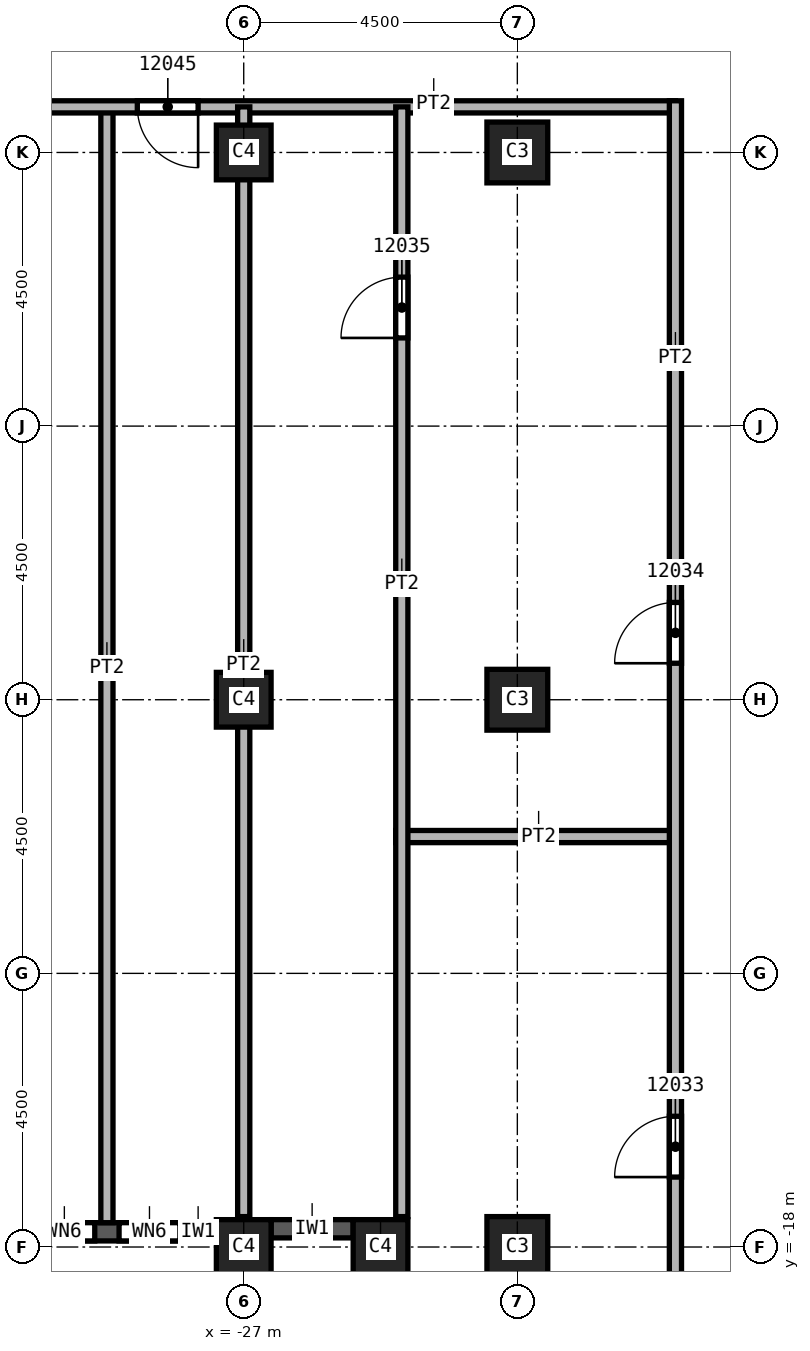
"""IFC4 building model, lengths in metres.
Left out: names, types, materials, properties, quantities, classifications, styles, units other than length and angle.
Written with IfcOpenShell. Run it as: python <this file> out.ifc"""

import sys

from ifc_helpers import new_model, si_unit, direction, frame, frame_2d, origin, origin_2d, place, context, subcontext, project, spatial, rectangle, extrude, element, fill, save


model = new_model("IFC4")
c1 = context("Model", 3, precision=1e-05, world=origin(), true_north=direction((0.0, 1.0)))
c2 = subcontext(c1, "Body", "Model", "MODEL_VIEW")
j1 = project(units=[si_unit("LENGTHUNIT", "METRE"), si_unit("PLANEANGLEUNIT", "RADIAN")], contexts=[c1])
p1 = place(None, origin())
s1 = spatial("IfcSite", under=j1, at=p1, CompositionType="ELEMENT")
p2 = place(p1, origin())
s2 = spatial("IfcBuilding", under=s1, at=p2, CompositionType="ELEMENT")
p3 = place(p2, frame((0.0, 0.0, 196.0)))
s3 = spatial("IfcBuildingStorey", under=s2, at=p3, CompositionType="ELEMENT", Elevation=196.0)
for number, where, z_axis, x_axis in (
    (1, (-22.5, 0.0, 0.0), (0.0, 0.0, 1.0), (1.0, 0.0, 0.0)),
    (2, (-22.5, -9.0, 0.0), (0.0, 0.0, 1.0), (1.0, 0.0, 0.0)),
    (3, (-22.5, -18.0, 0.0), (0.0, 0.0, 1.0), (1.0, 0.0, 0.0)),
):
    element("IfcColumn", number, at=place(p3, frame(where, z_axis=z_axis, x_axis=x_axis)), inside=s3, PredefinedType="COLUMN", context=c2, shape_type="SweptSolid", body=[
        extrude(rectangle(XDim=1.0, YDim=1.0, at=origin_2d()), origin(), (0.0, 0.0, 1.0), 3.72),
    ])
for number, where, z_axis, x_axis in (
    (4, (-27.0, 0.0, 0.0), (0.0, 0.0, 1.0), (1.0, 0.0, 0.0)),
    (5, (-27.0, -9.0, 0.0), (0.0, 0.0, 1.0), (1.0, 0.0, 0.0)),
    (6, (-27.0, -18.0, 0.0), (0.0, 0.0, 1.0), (1.0, 0.0, 0.0)),
    (7, (-24.75, -18.0, 0.0), (0.0, 0.0, 1.0), (1.0, 0.0, 0.0)),
):
    element("IfcColumn", number, at=place(p3, frame(where, z_axis=z_axis, x_axis=x_axis)), inside=s3, PredefinedType="COLUMN", context=c2, shape_type="SweptSolid", body=[
        extrude(rectangle(XDim=0.9, YDim=0.9, at=origin_2d()), origin(), (0.0, 0.0, 1.0), 3.72),
    ])
p4 = place(p3, frame((-31.05, -17.75, 0.0), z_axis=(0.0, 0.0, 1.0), x_axis=(1.0, 0.0, 0.0)))
e8 = element("IfcWall", 8, at=p4, inside=s3, PredefinedType="SOLIDWALL", context=c2, shape_type="SweptSolid", body=[
    extrude(rectangle(XDim=3.6, YDim=0.3, at=frame_2d((1.8, 0.0))), origin(), (0.0, 0.0, 1.0), 3.12),
])
p5 = place(p4, frame((0.6, 0.0, 0.8)))
e9 = element("IfcOpeningElement", 9, at=p5, cuts=e8, PredefinedType="OPENING", context=c2, shape_type="SweptSolid", body=[
    extrude(rectangle(XDim=1.0, YDim=1.95, at=frame_2d((0.5, 0.975))), frame((0.0, 0.15, 0.0), z_axis=(0.0, -1.0, 0.0), x_axis=(1.0, 0.0, 0.0)), (0.0, 0.0, 1.0), 0.3),
])
p6 = place(p4, frame((2.0, 0.0, 0.8)))
e10 = element("IfcOpeningElement", 10, at=p6, cuts=e8, PredefinedType="OPENING", context=c2, shape_type="SweptSolid", body=[
    extrude(rectangle(XDim=1.0, YDim=1.95, at=frame_2d((0.5, 0.975))), frame((0.0, 0.15, 0.0), z_axis=(0.0, -1.0, 0.0), x_axis=(1.0, 0.0, 0.0)), (0.0, 0.0, 1.0), 0.3),
])
p7 = place(p3, frame((-26.55, -17.7, 0.0), z_axis=(0.0, 0.0, 1.0), x_axis=(1.0, 0.0, 0.0)))
e11 = element("IfcWall", 11, at=p7, inside=s3, PredefinedType="SOLIDWALL", context=c2, shape_type="SweptSolid", body=[
    extrude(rectangle(XDim=1.35, YDim=0.3, at=frame_2d((0.675, 0.0))), origin(), (0.0, 0.0, 1.0), 3.12),
])
p8 = place(p3, frame((-29.25, 0.75, 0.0), z_axis=(0.0, 0.0, 1.0), x_axis=(0.0, -1.0, 0.0)))
e12 = element("IfcWall", 12, at=p8, inside=s3, PredefinedType="PARTITIONING", context=c2, shape_type="SweptSolid", body=[
    extrude(rectangle(XDim=18.35, YDim=0.2, at=frame_2d((9.175, 0.0))), origin(), (0.0, 0.0, 1.0), 3.72),
])
p9 = place(p3, frame((-19.9, 0.75, 0.0), z_axis=(0.0, 0.0, 1.0), x_axis=(-1.0, 0.0, 0.0)))
e13 = element("IfcWall", 13, at=p9, inside=s3, PredefinedType="PARTITIONING", context=c2, shape_type="SweptSolid", body=[
    extrude(rectangle(XDim=13.95, YDim=0.2, at=frame_2d((6.975, 0.0))), origin(), (0.0, 0.0, 1.0), 3.72),
])
p10 = place(p9, frame((7.85, 0.0, 0.0)))
e14 = element("IfcOpeningElement", 14, at=p10, cuts=e13, PredefinedType="OPENING", context=c2, shape_type="SweptSolid", body=[
    extrude(rectangle(XDim=1.0, YDim=2.1, at=frame_2d((0.5, 1.05))), frame((0.0, 0.1, 0.0), z_axis=(0.0, -1.0, 0.0), x_axis=(1.0, 0.0, 0.0)), (0.0, 0.0, 1.0), 0.2),
])
p11 = place(p3, frame((-27.0, -17.5, 0.0), z_axis=(0.0, 0.0, 1.0), x_axis=(0.0, 1.0, 0.0)))
e15 = element("IfcWall", 15, at=p11, inside=s3, PredefinedType="PARTITIONING", context=c2, shape_type="SweptSolid", body=[
    extrude(rectangle(XDim=18.25, YDim=0.2, at=frame_2d((9.125, 0.0))), origin(), (0.0, 0.0, 1.0), 3.72),
])
p12 = place(p3, frame((-24.5, -11.25, 0.0), z_axis=(0.0, 0.0, 1.0), x_axis=(1.0, 0.0, 0.0)))
e16 = element("IfcWall", 16, at=p12, inside=s3, PredefinedType="PARTITIONING", context=c2, shape_type="SweptSolid", body=[
    extrude(rectangle(XDim=4.6, YDim=0.2, at=frame_2d((2.3, 0.0))), origin(), (0.0, 0.0, 1.0), 3.72),
])
p13 = place(p3, frame((-24.4, -17.5, 0.0), z_axis=(0.0, 0.0, 1.0), x_axis=(0.0, 1.0, 0.0)))
e17 = element("IfcWall", 17, at=p13, inside=s3, PredefinedType="PARTITIONING", context=c2, shape_type="SweptSolid", body=[
    extrude(rectangle(XDim=18.25, YDim=0.2, at=frame_2d((9.125, 0.0))), origin(), (0.0, 0.0, 1.0), 3.72),
])
p14 = place(p13, frame((14.45, 0.0, 0.0)))
e18 = element("IfcOpeningElement", 18, at=p14, cuts=e17, PredefinedType="OPENING", context=c2, shape_type="SweptSolid", body=[
    extrude(rectangle(XDim=1.0, YDim=2.1, at=frame_2d((0.5, 1.05))), frame((0.0, 0.1, 0.0), z_axis=(0.0, -1.0, 0.0), x_axis=(1.0, 0.0, 0.0)), (0.0, 0.0, 1.0), 0.2),
])
p15 = place(p3, frame((-19.9, -22.4, 0.0), z_axis=(0.0, 0.0, 1.0), x_axis=(0.0, 1.0, 0.0)))
e19 = element("IfcWall", 19, at=p15, inside=s3, PredefinedType="PARTITIONING", context=c2, shape_type="SweptSolid", body=[
    extrude(rectangle(XDim=23.25, YDim=0.2, at=frame_2d((11.625, 0.0))), origin(), (0.0, 0.0, 1.0), 3.72),
])
p16 = place(p15, frame((5.55, 0.0, 0.0)))
e20 = element("IfcOpeningElement", 20, at=p16, cuts=e19, PredefinedType="OPENING", context=c2, shape_type="SweptSolid", body=[
    extrude(rectangle(XDim=1.0, YDim=2.1, at=frame_2d((0.5, 1.05))), frame((0.0, 0.1, 0.0), z_axis=(0.0, -1.0, 0.0), x_axis=(1.0, 0.0, 0.0)), (0.0, 0.0, 1.0), 0.2),
])
p17 = place(p15, frame((14.0, 0.0, 0.0)))
e21 = element("IfcOpeningElement", 21, at=p17, cuts=e19, PredefinedType="OPENING", context=c2, shape_type="SweptSolid", body=[
    extrude(rectangle(XDim=1.0, YDim=2.1, at=frame_2d((0.5, 1.05))), frame((0.0, 0.1, 0.0), z_axis=(0.0, -1.0, 0.0), x_axis=(1.0, 0.0, 0.0)), (0.0, 0.0, 1.0), 0.2),
])
p18 = place(p16, origin())
e22 = element("IfcDoor", 22, at=p18, inside=s3, OperationType="SINGLE_SWING_RIGHT", PredefinedType="DOOR", context=c2, shape_type="SweptSolid", body=[
    extrude(rectangle(XDim=1.0, YDim=2.1, at=frame_2d((0.5, 1.05))), frame((0.0, 0.025, 0.0), z_axis=(0.0, -1.0, 0.0), x_axis=(1.0, 0.0, 0.0)), (0.0, 0.0, 1.0), 0.05),
])
fill(e20, e22)
p19 = place(p17, origin())
e23 = element("IfcDoor", 23, at=p19, inside=s3, OperationType="SINGLE_SWING_LEFT", PredefinedType="DOOR", context=c2, shape_type="SweptSolid", body=[
    extrude(rectangle(XDim=1.0, YDim=2.1, at=frame_2d((0.5, 1.05))), frame((0.0, 0.025, 0.0), z_axis=(0.0, -1.0, 0.0), x_axis=(1.0, 0.0, 0.0)), (0.0, 0.0, 1.0), 0.05),
])
fill(e21, e23)
p20 = place(p14, origin())
e24 = element("IfcDoor", 24, at=p20, inside=s3, OperationType="SINGLE_SWING_RIGHT", PredefinedType="DOOR", context=c2, shape_type="SweptSolid", body=[
    extrude(rectangle(XDim=1.0, YDim=2.1, at=frame_2d((0.5, 1.05))), frame((0.0, 0.025, 0.0), z_axis=(0.0, -1.0, 0.0), x_axis=(1.0, 0.0, 0.0)), (0.0, 0.0, 1.0), 0.05),
])
fill(e18, e24)
p21 = place(p10, origin())
e25 = element("IfcDoor", 25, at=p21, inside=s3, OperationType="SINGLE_SWING_RIGHT", PredefinedType="DOOR", context=c2, shape_type="SweptSolid", body=[
    extrude(rectangle(XDim=1.0, YDim=2.1, at=frame_2d((0.5, 1.05))), frame((0.0, 0.025, 0.0), z_axis=(0.0, -1.0, 0.0), x_axis=(1.0, 0.0, 0.0)), (0.0, 0.0, 1.0), 0.05),
])
fill(e14, e25)
p22 = place(p5, origin())
e26 = element("IfcWindow", 26, at=p22, inside=s3, PartitioningType="SINGLE_PANEL", PredefinedType="WINDOW", context=c2, shape_type="SweptSolid", body=[
    extrude(rectangle(XDim=1.0, YDim=1.95, at=frame_2d((0.5, 0.975))), frame((0.0, 0.03, 0.0), z_axis=(0.0, -1.0, 0.0), x_axis=(1.0, 0.0, 0.0)), (0.0, 0.0, 1.0), 0.06),
])
fill(e9, e26)
p23 = place(p6, origin())
e27 = element("IfcWindow", 27, at=p23, inside=s3, PartitioningType="SINGLE_PANEL", PredefinedType="WINDOW", context=c2, shape_type="SweptSolid", body=[
    extrude(rectangle(XDim=1.0, YDim=1.95, at=frame_2d((0.5, 0.975))), frame((0.0, 0.03, 0.0), z_axis=(0.0, -1.0, 0.0), x_axis=(1.0, 0.0, 0.0)), (0.0, 0.0, 1.0), 0.06),
])
fill(e10, e27)
save(model, sys.argv[1])
